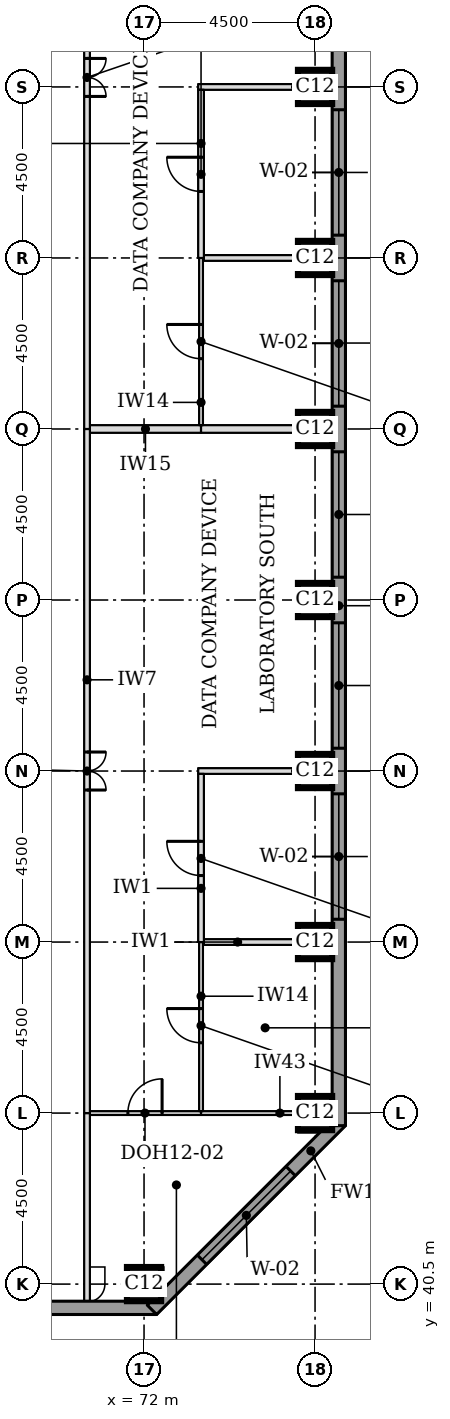
"""IFC4 building model, lengths in metres.
Left out: names, types, materials, properties, quantities, classifications, styles, units other than length and angle.
Written with IfcOpenShell. Run it as: python <this file> out.ifc"""

import sys

from ifc_helpers import new_model, si_unit, direction, frame, frame_2d, origin, origin_2d, place, context, subcontext, project, spatial, rectangle, extrude, element, fill, save


model = new_model("IFC4")
c1 = context("Model", 3, precision=1e-05, world=origin(), true_north=direction((0.0, 1.0)))
c2 = subcontext(c1, "Body", "Model", "MODEL_VIEW")
j1 = project(units=[si_unit("LENGTHUNIT", "METRE"), si_unit("PLANEANGLEUNIT", "RADIAN")], contexts=[c1])
p1 = place(None, origin())
s1 = spatial("IfcSite", under=j1, at=p1, CompositionType="ELEMENT")
p2 = place(p1, origin())
s2 = spatial("IfcBuilding", under=s1, at=p2, CompositionType="ELEMENT")
p3 = place(p2, frame((0.0, 0.0, 245.2)))
s3 = spatial("IfcBuildingStorey", under=s2, at=p3, CompositionType="ELEMENT", Elevation=245.2)
for number, where, z_axis, x_axis in (
    (1, (72.0, 40.5, 0.0), (0.0, 0.0, 1.0), (1.0, 0.0, 0.0)),
    (2, (76.5, 45.0, 0.0), (0.0, 0.0, 1.0), (1.0, 0.0, 0.0)),
    (3, (76.5, 49.5, 0.0), (0.0, 0.0, 1.0), (1.0, 0.0, 0.0)),
    (4, (76.5, 54.0, 0.0), (0.0, 0.0, 1.0), (1.0, 0.0, 0.0)),
    (5, (76.5, 58.5, 0.0), (0.0, 0.0, 1.0), (1.0, 0.0, 0.0)),
    (6, (76.5, 63.0, 0.0), (0.0, 0.0, 1.0), (1.0, 0.0, 0.0)),
    (7, (76.5, 67.5, 0.0), (0.0, 0.0, 1.0), (1.0, 0.0, 0.0)),
    (8, (76.5, 72.0, 0.0), (0.0, 0.0, 1.0), (1.0, 0.0, 0.0)),
):
    element("IfcColumn", number, at=place(p3, frame(where, z_axis=z_axis, x_axis=x_axis)), inside=s3, PredefinedType="COLUMN", context=c2, shape_type="SweptSolid", body=[
        extrude(rectangle(XDim=0.9, YDim=0.9, at=origin_2d()), origin(), (0.0, 0.0, 1.0), 3.7),
    ])
p4 = place(p3, frame((36.0, 39.875, 0.0), z_axis=(0.0, 0.0, 1.0), x_axis=(1.0, 0.0, 0.0)))
e9 = element("IfcWall", 9, at=p4, inside=s3, PredefinedType="STANDARD", context=c2, shape_type="SweptSolid", body=[
    extrude(rectangle(XDim=36.331, YDim=0.35, at=frame_2d((18.166, 0.0))), origin(), (0.0, 0.0, 1.0), 3.525),
])
p5 = place(p4, frame((5.1, 0.0, 0.9)))
e10 = element("IfcOpeningElement", 10, at=p5, cuts=e9, PredefinedType="OPENING", context=c2, shape_type="SweptSolid", body=[
    extrude(rectangle(XDim=3.3, YDim=1.9, at=frame_2d((1.65, 0.95))), frame((0.0, 0.185, 0.0), z_axis=(0.0, -1.0, 0.0), x_axis=(1.0, 0.0, 0.0)), (0.0, 0.0, 1.0), 0.37),
])
p6 = place(p4, frame((9.6, 0.0, 0.9)))
e11 = element("IfcOpeningElement", 11, at=p6, cuts=e9, PredefinedType="OPENING", context=c2, shape_type="SweptSolid", body=[
    extrude(rectangle(XDim=3.3, YDim=1.9, at=frame_2d((1.65, 0.95))), frame((0.0, 0.185, 0.0), z_axis=(0.0, -1.0, 0.0), x_axis=(1.0, 0.0, 0.0)), (0.0, 0.0, 1.0), 0.37),
])
p7 = place(p4, frame((14.1, 0.0, 0.9)))
e12 = element("IfcOpeningElement", 12, at=p7, cuts=e9, PredefinedType="OPENING", context=c2, shape_type="SweptSolid", body=[
    extrude(rectangle(XDim=3.3, YDim=1.9, at=frame_2d((1.65, 0.95))), frame((0.0, 0.185, 0.0), z_axis=(0.0, -1.0, 0.0), x_axis=(1.0, 0.0, 0.0)), (0.0, 0.0, 1.0), 0.37),
])
p8 = place(p4, frame((18.6, 0.0, 0.9)))
e13 = element("IfcOpeningElement", 13, at=p8, cuts=e9, PredefinedType="OPENING", context=c2, shape_type="SweptSolid", body=[
    extrude(rectangle(XDim=3.3, YDim=1.9, at=frame_2d((1.65, 0.95))), frame((0.0, 0.185, 0.0), z_axis=(0.0, -1.0, 0.0), x_axis=(1.0, 0.0, 0.0)), (0.0, 0.0, 1.0), 0.37),
])
p9 = place(p4, frame((23.1, 0.0, 0.9)))
e14 = element("IfcOpeningElement", 14, at=p9, cuts=e9, PredefinedType="OPENING", context=c2, shape_type="SweptSolid", body=[
    extrude(rectangle(XDim=3.3, YDim=1.9, at=frame_2d((1.65, 0.95))), frame((0.0, 0.185, 0.0), z_axis=(0.0, -1.0, 0.0), x_axis=(1.0, 0.0, 0.0)), (0.0, 0.0, 1.0), 0.37),
])
p10 = place(p4, frame((27.6, 0.0, 0.9)))
e15 = element("IfcOpeningElement", 15, at=p10, cuts=e9, PredefinedType="OPENING", context=c2, shape_type="SweptSolid", body=[
    extrude(rectangle(XDim=3.3, YDim=1.9, at=frame_2d((1.65, 0.95))), frame((0.0, 0.185, 0.0), z_axis=(0.0, -1.0, 0.0), x_axis=(1.0, 0.0, 0.0)), (0.0, 0.0, 1.0), 0.37),
])
p11 = place(p3, frame((72.208, 39.824, 0.0), z_axis=(0.0, 0.0, 1.0), x_axis=(0.707106781187, 0.707106781187, 0.0)))
e16 = element("IfcWall", 16, at=p11, inside=s3, PredefinedType="STANDARD", context=c2, shape_type="SweptSolid", body=[
    extrude(rectangle(XDim=7.027, YDim=0.35, at=frame_2d((3.513, 0.0))), origin(), (0.0, 0.0, 1.0), 3.525),
])
p12 = place(p11, frame((1.863, 0.0, 0.9)))
e17 = element("IfcOpeningElement", 17, at=p12, cuts=e16, PredefinedType="OPENING", context=c2, shape_type="SweptSolid", body=[
    extrude(rectangle(XDim=3.3, YDim=1.9, at=frame_2d((1.65, 0.95))), frame((0.0, 0.185, 0.0), z_axis=(0.0, -1.0, 0.0), x_axis=(1.0, 0.0, 0.0)), (0.0, 0.0, 1.0), 0.37),
])
p13 = place(p3, frame((77.125, 44.669, 0.0), z_axis=(0.0, 0.0, 1.0), x_axis=(0.0, 1.0, 0.0)))
e18 = element("IfcWall", 18, at=p13, inside=s3, PredefinedType="STANDARD", context=c2, shape_type="SweptSolid", body=[
    extrude(rectangle(XDim=32.163, YDim=0.35, at=frame_2d((16.081, 0.0))), origin(), (0.0, 0.0, 1.0), 3.525),
])
p14 = place(p13, frame((5.431, 0.0, 0.9)))
e19 = element("IfcOpeningElement", 19, at=p14, cuts=e18, PredefinedType="OPENING", context=c2, shape_type="SweptSolid", body=[
    extrude(rectangle(XDim=3.3, YDim=1.9, at=frame_2d((1.65, 0.95))), frame((0.0, 0.185, 0.0), z_axis=(0.0, -1.0, 0.0), x_axis=(1.0, 0.0, 0.0)), (0.0, 0.0, 1.0), 0.37),
])
p15 = place(p13, frame((9.931, 0.0, 0.9)))
e20 = element("IfcOpeningElement", 20, at=p15, cuts=e18, PredefinedType="OPENING", context=c2, shape_type="SweptSolid", body=[
    extrude(rectangle(XDim=3.3, YDim=1.9, at=frame_2d((1.65, 0.95))), frame((0.0, 0.185, 0.0), z_axis=(0.0, -1.0, 0.0), x_axis=(1.0, 0.0, 0.0)), (0.0, 0.0, 1.0), 0.37),
])
p16 = place(p13, frame((14.431, 0.0, 0.9)))
e21 = element("IfcOpeningElement", 21, at=p16, cuts=e18, PredefinedType="OPENING", context=c2, shape_type="SweptSolid", body=[
    extrude(rectangle(XDim=3.3, YDim=1.9, at=frame_2d((1.65, 0.95))), frame((0.0, 0.185, 0.0), z_axis=(0.0, -1.0, 0.0), x_axis=(1.0, 0.0, 0.0)), (0.0, 0.0, 1.0), 0.37),
])
p17 = place(p13, frame((18.931, 0.0, 0.9)))
e22 = element("IfcOpeningElement", 22, at=p17, cuts=e18, PredefinedType="OPENING", context=c2, shape_type="SweptSolid", body=[
    extrude(rectangle(XDim=3.3, YDim=1.9, at=frame_2d((1.65, 0.95))), frame((0.0, 0.185, 0.0), z_axis=(0.0, -1.0, 0.0), x_axis=(1.0, 0.0, 0.0)), (0.0, 0.0, 1.0), 0.37),
])
p18 = place(p13, frame((23.431, 0.0, 0.9)))
e23 = element("IfcOpeningElement", 23, at=p18, cuts=e18, PredefinedType="OPENING", context=c2, shape_type="SweptSolid", body=[
    extrude(rectangle(XDim=3.3, YDim=1.9, at=frame_2d((1.65, 0.95))), frame((0.0, 0.185, 0.0), z_axis=(0.0, -1.0, 0.0), x_axis=(1.0, 0.0, 0.0)), (0.0, 0.0, 1.0), 0.37),
])
p19 = place(p3, frame((70.575, 45.0, 0.0), z_axis=(0.0, 0.0, 1.0), x_axis=(1.0, 0.0, 0.0)))
e24 = element("IfcWall", 24, at=p19, inside=s3, PredefinedType="PARTITIONING", context=c2, shape_type="SweptSolid", body=[
    extrude(rectangle(XDim=2.925, YDim=0.1, at=frame_2d((1.462, 0.0))), origin(), (0.0, 0.0, 1.0), 3.096),
])
p20 = place(p19, frame((1.0, 0.0, 0.0)))
e25 = element("IfcOpeningElement", 25, at=p20, cuts=e24, PredefinedType="OPENING", context=c2, shape_type="SweptSolid", body=[
    extrude(rectangle(XDim=0.9, YDim=2.1, at=frame_2d((0.45, 1.05))), frame((0.0, 0.06, 0.0), z_axis=(0.0, -1.0, 0.0), x_axis=(1.0, 0.0, 0.0)), (0.0, 0.0, 1.0), 0.12),
])
p21 = place(p3, frame((73.5, 45.0, 0.0), z_axis=(0.0, 0.0, 1.0), x_axis=(1.0, 0.0, 0.0)))
e26 = element("IfcWall", 26, at=p21, inside=s3, PredefinedType="PARTITIONING", context=c2, shape_type="SweptSolid", body=[
    extrude(rectangle(XDim=2.55, YDim=0.1, at=frame_2d((1.275, 0.0))), origin(), (0.0, 0.0, 1.0), 3.096),
])
p22 = place(p3, frame((73.575, 49.5, 0.0), z_axis=(0.0, 0.0, 1.0), x_axis=(1.0, 0.0, 0.0)))
e27 = element("IfcWall", 27, at=p22, inside=s3, PredefinedType="PARTITIONING", context=c2, shape_type="SweptSolid", body=[
    extrude(rectangle(XDim=3.375, YDim=0.15, at=frame_2d((1.688, 0.0))), origin(), (0.0, 0.0, 1.0), 3.55),
])
p23 = place(p3, frame((73.425, 54.0, 0.0), z_axis=(0.0, 0.0, 1.0), x_axis=(1.0, 0.0, 0.0)))
e28 = element("IfcWall", 28, at=p23, inside=s3, PredefinedType="PARTITIONING", context=c2, shape_type="SweptSolid", body=[
    extrude(rectangle(XDim=3.525, YDim=0.15, at=frame_2d((1.762, 0.0))), origin(), (0.0, 0.0, 1.0), 3.55),
])
p24 = place(p3, frame((70.575, 63.0, 0.0), z_axis=(0.0, 0.0, 1.0), x_axis=(1.0, 0.0, 0.0)))
e29 = element("IfcWall", 29, at=p24, inside=s3, PredefinedType="PARTITIONING", context=c2, shape_type="SweptSolid", body=[
    extrude(rectangle(XDim=2.925, YDim=0.2, at=frame_2d((1.462, 0.0))), origin(), (0.0, 0.0, 1.0), 3.55),
])
p25 = place(p3, frame((73.5, 63.0, 0.0), z_axis=(0.0, 0.0, 1.0), x_axis=(1.0, 0.0, 0.0)))
e30 = element("IfcWall", 30, at=p25, inside=s3, PredefinedType="PARTITIONING", context=c2, shape_type="SweptSolid", body=[
    extrude(rectangle(XDim=3.45, YDim=0.2, at=frame_2d((1.725, 0.0))), origin(), (0.0, 0.0, 1.0), 3.55),
])
p26 = place(p3, frame((73.575, 67.5, 0.0), z_axis=(0.0, 0.0, 1.0), x_axis=(1.0, 0.0, 0.0)))
e31 = element("IfcWall", 31, at=p26, inside=s3, PredefinedType="PARTITIONING", context=c2, shape_type="SweptSolid", body=[
    extrude(rectangle(XDim=3.375, YDim=0.15, at=frame_2d((1.688, 0.0))), origin(), (0.0, 0.0, 1.0), 3.55),
])
p27 = place(p3, frame((73.425, 72.0, 0.0), z_axis=(0.0, 0.0, 1.0), x_axis=(1.0, 0.0, 0.0)))
e32 = element("IfcWall", 32, at=p27, inside=s3, PredefinedType="PARTITIONING", context=c2, shape_type="SweptSolid", body=[
    extrude(rectangle(XDim=3.525, YDim=0.15, at=frame_2d((1.762, 0.0))), origin(), (0.0, 0.0, 1.0), 3.55),
])
p28 = place(p3, frame((70.5, 40.05, 0.0), z_axis=(0.0, 0.0, 1.0), x_axis=(0.0, 1.0, 0.0)))
e33 = element("IfcWall", 33, at=p28, inside=s3, PredefinedType="PARTITIONING", context=c2, shape_type="SweptSolid", body=[
    extrude(rectangle(XDim=4.95, YDim=0.15, at=frame_2d((2.475, 0.0))), origin(), (0.0, 0.0, 1.0), 3.55),
])
p29 = place(p3, frame((70.5, 45.0, 0.0), z_axis=(0.0, 0.0, 1.0), x_axis=(0.0, 1.0, 0.0)))
e34 = element("IfcWall", 34, at=p29, inside=s3, PredefinedType="PARTITIONING", context=c2, shape_type="SweptSolid", body=[
    extrude(rectangle(XDim=18.0, YDim=0.15, at=frame_2d((9.0, 0.0))), origin(), (0.0, 0.0, 1.0), 3.55),
])
p30 = place(p29, frame((8.5, 0.0, 0.0)))
e35 = element("IfcOpeningElement", 35, at=p30, cuts=e34, PredefinedType="OPENING", context=c2, shape_type="SweptSolid", body=[
    extrude(rectangle(XDim=1.0, YDim=2.1, at=frame_2d((0.5, 1.05))), frame((0.0, 0.085, 0.0), z_axis=(0.0, -1.0, 0.0), x_axis=(1.0, 0.0, 0.0)), (0.0, 0.0, 1.0), 0.17),
])
p31 = place(p3, frame((73.5, 45.05, 0.0), z_axis=(0.0, 0.0, 1.0), x_axis=(0.0, 1.0, 0.0)))
e36 = element("IfcWall", 36, at=p31, inside=s3, PredefinedType="PARTITIONING", context=c2, shape_type="SweptSolid", body=[
    extrude(rectangle(XDim=4.45, YDim=0.1, at=frame_2d((2.225, 0.0))), origin(), (0.0, 0.0, 1.0), 3.55),
])
p32 = place(p31, frame((1.8, 0.0, 0.0)))
e37 = element("IfcOpeningElement", 37, at=p32, cuts=e36, PredefinedType="OPENING", context=c2, shape_type="SweptSolid", body=[
    extrude(rectangle(XDim=0.9, YDim=2.1, at=frame_2d((0.45, 1.05))), frame((0.0, 0.06, 0.0), z_axis=(0.0, -1.0, 0.0), x_axis=(1.0, 0.0, 0.0)), (0.0, 0.0, 1.0), 0.12),
])
p33 = place(p3, frame((73.5, 49.5, 0.0), z_axis=(0.0, 0.0, 1.0), x_axis=(0.0, 1.0, 0.0)))
e38 = element("IfcWall", 38, at=p33, inside=s3, PredefinedType="PARTITIONING", context=c2, shape_type="SweptSolid", body=[
    extrude(rectangle(XDim=4.425, YDim=0.15, at=frame_2d((2.212, 0.0))), origin(), (0.0, 0.0, 1.0), 3.55),
])
p34 = place(p33, frame((1.75, 0.0, 0.0)))
e39 = element("IfcOpeningElement", 39, at=p34, cuts=e38, PredefinedType="OPENING", context=c2, shape_type="SweptSolid", body=[
    extrude(rectangle(XDim=0.9, YDim=2.1, at=frame_2d((0.45, 1.05))), frame((0.0, 0.085, 0.0), z_axis=(0.0, -1.0, 0.0), x_axis=(1.0, 0.0, 0.0)), (0.0, 0.0, 1.0), 0.17),
])
p35 = place(p3, frame((70.5, 63.0, 0.0), z_axis=(0.0, 0.0, 1.0), x_axis=(0.0, 1.0, 0.0)))
e40 = element("IfcWall", 40, at=p35, inside=s3, PredefinedType="PARTITIONING", context=c2, shape_type="SweptSolid", body=[
    extrude(rectangle(XDim=18.45, YDim=0.15, at=frame_2d((9.225, 0.0))), origin(), (0.0, 0.0, 1.0), 3.55),
])
p36 = place(p35, frame((8.75, 0.0, 0.0)))
e41 = element("IfcOpeningElement", 41, at=p36, cuts=e40, PredefinedType="OPENING", context=c2, shape_type="SweptSolid", body=[
    extrude(rectangle(XDim=1.0, YDim=2.1, at=frame_2d((0.5, 1.05))), frame((0.0, 0.085, 0.0), z_axis=(0.0, -1.0, 0.0), x_axis=(1.0, 0.0, 0.0)), (0.0, 0.0, 1.0), 0.17),
])
p37 = place(p3, frame((73.5, 63.1, 0.0), z_axis=(0.0, 0.0, 1.0), x_axis=(0.0, 1.0, 0.0)))
e42 = element("IfcWall", 42, at=p37, inside=s3, PredefinedType="PARTITIONING", context=c2, shape_type="SweptSolid", body=[
    extrude(rectangle(XDim=4.4, YDim=0.1, at=frame_2d((2.2, 0.0))), origin(), (0.0, 0.0, 1.0), 3.55),
])
p38 = place(p37, frame((1.75, 0.0, 0.0)))
e43 = element("IfcOpeningElement", 43, at=p38, cuts=e42, PredefinedType="OPENING", context=c2, shape_type="SweptSolid", body=[
    extrude(rectangle(XDim=0.9, YDim=2.1, at=frame_2d((0.45, 1.05))), frame((0.0, 0.06, 0.0), z_axis=(0.0, -1.0, 0.0), x_axis=(1.0, 0.0, 0.0)), (0.0, 0.0, 1.0), 0.12),
])
p39 = place(p3, frame((73.5, 67.5, 0.0), z_axis=(0.0, 0.0, 1.0), x_axis=(0.0, 1.0, 0.0)))
e44 = element("IfcWall", 44, at=p39, inside=s3, PredefinedType="PARTITIONING", context=c2, shape_type="SweptSolid", body=[
    extrude(rectangle(XDim=4.425, YDim=0.15, at=frame_2d((2.212, 0.0))), origin(), (0.0, 0.0, 1.0), 3.55),
])
p40 = place(p39, frame((1.75, 0.0, 0.0)))
e45 = element("IfcOpeningElement", 45, at=p40, cuts=e44, PredefinedType="OPENING", context=c2, shape_type="SweptSolid", body=[
    extrude(rectangle(XDim=0.9, YDim=2.1, at=frame_2d((0.45, 1.05))), frame((0.0, 0.085, 0.0), z_axis=(0.0, -1.0, 0.0), x_axis=(1.0, 0.0, 0.0)), (0.0, 0.0, 1.0), 0.17),
])
p41 = place(p12, origin())
e46 = element("IfcWindow", 46, at=p41, inside=s3, PartitioningType="SINGLE_PANEL", PredefinedType="WINDOW", context=c2, shape_type="SweptSolid", body=[
    extrude(rectangle(XDim=3.3, YDim=1.9, at=frame_2d((1.65, 0.95))), frame((0.0, 0.085, 0.0), z_axis=(0.0, -1.0, 0.0), x_axis=(1.0, 0.0, 0.0)), (0.0, 0.0, 1.0), 0.06),
])
fill(e17, e46)
p42 = place(p14, origin())
e47 = element("IfcWindow", 47, at=p42, inside=s3, PartitioningType="SINGLE_PANEL", PredefinedType="WINDOW", context=c2, shape_type="SweptSolid", body=[
    extrude(rectangle(XDim=3.3, YDim=1.9, at=frame_2d((1.65, 0.95))), frame((0.0, 0.085, 0.0), z_axis=(0.0, -1.0, 0.0), x_axis=(1.0, 0.0, 0.0)), (0.0, 0.0, 1.0), 0.06),
])
fill(e19, e47)
p43 = place(p15, origin())
e48 = element("IfcWindow", 48, at=p43, inside=s3, PartitioningType="SINGLE_PANEL", PredefinedType="WINDOW", context=c2, shape_type="SweptSolid", body=[
    extrude(rectangle(XDim=3.3, YDim=1.9, at=frame_2d((1.65, 0.95))), frame((0.0, 0.085, 0.0), z_axis=(0.0, -1.0, 0.0), x_axis=(1.0, 0.0, 0.0)), (0.0, 0.0, 1.0), 0.06),
])
fill(e20, e48)
p44 = place(p16, origin())
e49 = element("IfcWindow", 49, at=p44, inside=s3, PartitioningType="SINGLE_PANEL", PredefinedType="WINDOW", context=c2, shape_type="SweptSolid", body=[
    extrude(rectangle(XDim=3.3, YDim=1.9, at=frame_2d((1.65, 0.95))), frame((0.0, 0.085, 0.0), z_axis=(0.0, -1.0, 0.0), x_axis=(1.0, 0.0, 0.0)), (0.0, 0.0, 1.0), 0.06),
])
fill(e21, e49)
p45 = place(p17, origin())
e50 = element("IfcWindow", 50, at=p45, inside=s3, PartitioningType="SINGLE_PANEL", PredefinedType="WINDOW", context=c2, shape_type="SweptSolid", body=[
    extrude(rectangle(XDim=3.3, YDim=1.9, at=frame_2d((1.65, 0.95))), frame((0.0, 0.085, 0.0), z_axis=(0.0, -1.0, 0.0), x_axis=(1.0, 0.0, 0.0)), (0.0, 0.0, 1.0), 0.06),
])
fill(e22, e50)
p46 = place(p18, origin())
e51 = element("IfcWindow", 51, at=p46, inside=s3, PartitioningType="SINGLE_PANEL", PredefinedType="WINDOW", context=c2, shape_type="SweptSolid", body=[
    extrude(rectangle(XDim=3.3, YDim=1.9, at=frame_2d((1.65, 0.95))), frame((0.0, 0.085, 0.0), z_axis=(0.0, -1.0, 0.0), x_axis=(1.0, 0.0, 0.0)), (0.0, 0.0, 1.0), 0.06),
])
fill(e23, e51)
p47 = place(p30, frame((1.0, 0.0, 0.0), z_axis=(0.0, 0.0, 1.0), x_axis=(-1.0, 0.0, 0.0)))
e52 = element("IfcDoor", 52, at=p47, inside=s3, OperationType="DOUBLE_DOOR_SINGLE_SWING", PredefinedType="DOOR", context=c2, shape_type="SweptSolid", body=[
    extrude(rectangle(XDim=1.0, YDim=2.1, at=frame_2d((0.5, 1.05))), frame((0.0, 0.025, 0.0), z_axis=(0.0, -1.0, 0.0), x_axis=(1.0, 0.0, 0.0)), (0.0, 0.0, 1.0), 0.05),
])
fill(e35, e52)
p48 = place(p20, origin())
e53 = element("IfcDoor", 53, at=p48, inside=s3, OperationType="SINGLE_SWING_RIGHT", PredefinedType="DOOR", context=c2, shape_type="SweptSolid", body=[
    extrude(rectangle(XDim=0.9, YDim=2.1, at=frame_2d((0.45, 1.05))), frame((0.0, 0.025, 0.0), z_axis=(0.0, -1.0, 0.0), x_axis=(1.0, 0.0, 0.0)), (0.0, 0.0, 1.0), 0.05),
])
fill(e25, e53)
p49 = place(p32, origin())
e54 = element("IfcDoor", 54, at=p49, inside=s3, OperationType="SINGLE_SWING_RIGHT", PredefinedType="DOOR", context=c2, shape_type="SweptSolid", body=[
    extrude(rectangle(XDim=0.9, YDim=2.1, at=frame_2d((0.45, 1.05))), frame((0.0, 0.025, 0.0), z_axis=(0.0, -1.0, 0.0), x_axis=(1.0, 0.0, 0.0)), (0.0, 0.0, 1.0), 0.05),
])
fill(e37, e54)
p50 = place(p34, origin())
e55 = element("IfcDoor", 55, at=p50, inside=s3, OperationType="SINGLE_SWING_RIGHT", PredefinedType="DOOR", context=c2, shape_type="SweptSolid", body=[
    extrude(rectangle(XDim=0.9, YDim=2.1, at=frame_2d((0.45, 1.05))), frame((0.0, 0.025, 0.0), z_axis=(0.0, -1.0, 0.0), x_axis=(1.0, 0.0, 0.0)), (0.0, 0.0, 1.0), 0.05),
])
fill(e39, e55)
p51 = place(p36, frame((1.0, 0.0, 0.0), z_axis=(0.0, 0.0, 1.0), x_axis=(-1.0, 0.0, 0.0)))
e56 = element("IfcDoor", 56, at=p51, inside=s3, OperationType="DOUBLE_DOOR_SINGLE_SWING", PredefinedType="DOOR", context=c2, shape_type="SweptSolid", body=[
    extrude(rectangle(XDim=1.0, YDim=2.1, at=frame_2d((0.5, 1.05))), frame((0.0, 0.025, 0.0), z_axis=(0.0, -1.0, 0.0), x_axis=(1.0, 0.0, 0.0)), (0.0, 0.0, 1.0), 0.05),
])
fill(e41, e56)
p52 = place(p38, origin())
e57 = element("IfcDoor", 57, at=p52, inside=s3, OperationType="SINGLE_SWING_RIGHT", PredefinedType="DOOR", context=c2, shape_type="SweptSolid", body=[
    extrude(rectangle(XDim=0.9, YDim=2.1, at=frame_2d((0.45, 1.05))), frame((0.0, 0.025, 0.0), z_axis=(0.0, -1.0, 0.0), x_axis=(1.0, 0.0, 0.0)), (0.0, 0.0, 1.0), 0.05),
])
fill(e43, e57)
p53 = place(p40, origin())
e58 = element("IfcDoor", 58, at=p53, inside=s3, OperationType="SINGLE_SWING_RIGHT", PredefinedType="DOOR", context=c2, shape_type="SweptSolid", body=[
    extrude(rectangle(XDim=0.9, YDim=2.1, at=frame_2d((0.45, 1.05))), frame((0.0, 0.025, 0.0), z_axis=(0.0, -1.0, 0.0), x_axis=(1.0, 0.0, 0.0)), (0.0, 0.0, 1.0), 0.05),
])
fill(e45, e58)
save(model, sys.argv[1])
